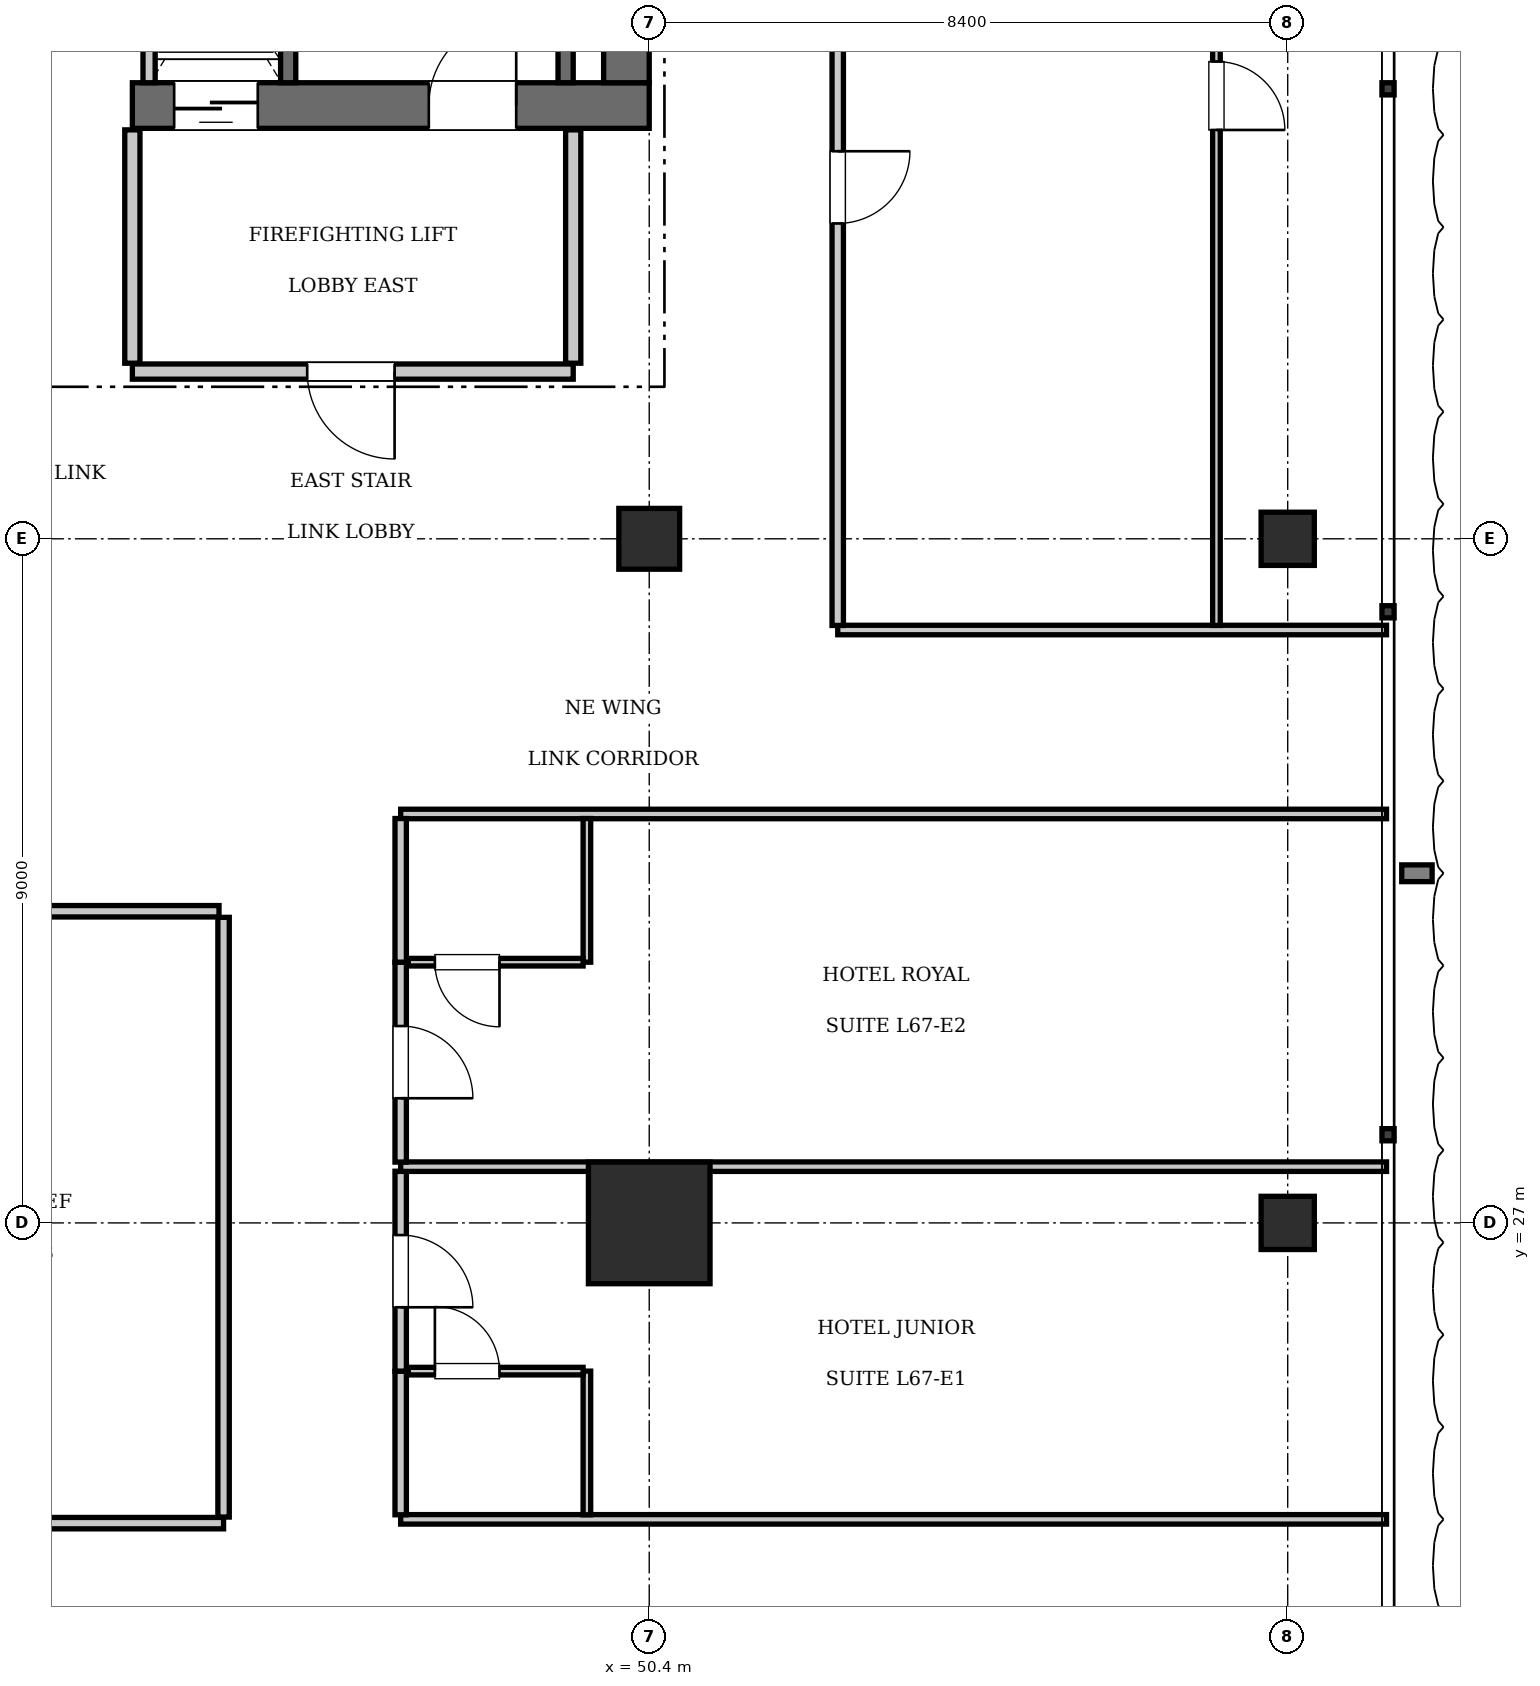
"""IFC4 building model, lengths in metres.
Left out: names, types, materials, properties, quantities, classifications, styles, units other than length and angle.
Written with IfcOpenShell. Run it as: python <this file> out.ifc"""

import sys

from ifc_helpers import new_model, si_unit, direction, frame, frame_2d, origin, origin_2d, place, context, subcontext, project, spatial, rectangle, extrude, element, fill, save


model = new_model("IFC4")
c1 = context("Model", 3, precision=1e-05, world=origin(), true_north=direction((0.0, 1.0)))
c2 = subcontext(c1, "Body", "Model", "MODEL_VIEW")
j1 = project(units=[si_unit("LENGTHUNIT", "METRE"), si_unit("PLANEANGLEUNIT", "RADIAN")], contexts=[c1])
p1 = place(None, origin())
s1 = spatial("IfcSite", under=j1, at=p1, CompositionType="ELEMENT")
p2 = place(p1, origin())
s2 = spatial("IfcBuilding", under=s1, at=p2, CompositionType="ELEMENT")
p3 = place(p2, frame((0.0, 0.0, 274.05)))
s3 = spatial("IfcBuildingStorey", under=s2, at=p3, CompositionType="ELEMENT", Elevation=274.05)
p4 = place(p3, frame((50.4, 27.0, 0.0), z_axis=(0.0, 0.0, 1.0), x_axis=(1.0, 0.0, 0.0)))
e1 = element("IfcColumn", 1, at=p4, inside=s3, PredefinedType="COLUMN", context=c2, shape_type="SweptSolid", body=[
    extrude(rectangle(XDim=1.6, YDim=1.6, at=origin_2d()), origin(), (0.0, 0.0, 1.0), 3.85),
])
p5 = place(p3, frame((43.6, 41.7, 0.0), z_axis=(0.0, 0.0, 1.0), x_axis=(1.0, 0.0, 0.0)))
e2 = element("IfcWall", 2, at=p5, inside=s3, PredefinedType="SHEAR", context=c2, shape_type="SweptSolid", body=[
    extrude(rectangle(XDim=6.8, YDim=0.6, at=frame_2d((3.4, 0.0))), origin(), (0.0, 0.0, 1.0), 3.85),
])
p6 = place(p5, frame((3.9, 0.0, 0.0)))
e3 = element("IfcOpeningElement", 3, at=p6, cuts=e2, PredefinedType="OPENING", context=c2, shape_type="SweptSolid", body=[
    extrude(rectangle(XDim=1.15, YDim=2.15, at=frame_2d((0.575, 1.075))), frame((0.0, 0.31, 0.0), z_axis=(0.0, -1.0, 0.0), x_axis=(1.0, 0.0, 0.0)), (0.0, 0.0, 1.0), 0.62),
])
p7 = place(p5, frame((0.55, 0.0, 0.0)))
e4 = element("IfcOpeningElement", 4, at=p7, cuts=e2, PredefinedType="OPENING", context=c2, shape_type="SweptSolid", body=[
    extrude(rectangle(XDim=1.1, YDim=2.2, at=frame_2d((0.55, 1.1))), frame((0.0, 0.31, 0.0), z_axis=(0.0, -1.0, 0.0), x_axis=(1.0, 0.0, 0.0)), (0.0, 0.0, 1.0), 0.62),
])
p8 = place(p3, frame((50.1, 42.0, 0.0), z_axis=(0.0, 0.0, 1.0), x_axis=(0.0, 1.0, 0.0)))
e5 = element("IfcWall", 5, at=p8, inside=s3, PredefinedType="SHEAR", context=c2, shape_type="SweptSolid", body=[
    extrude(rectangle(XDim=2.2, YDim=0.6, at=frame_2d((1.1, 0.0))), origin(), (0.0, 0.0, 1.0), 3.85),
])
p9 = place(p3, frame((50.4, 36.0, 0.0), z_axis=(0.0, 0.0, 1.0), x_axis=(1.0, 0.0, 0.0)))
e6 = element("IfcColumn", 6, at=p9, inside=s3, PredefinedType="COLUMN", context=c2, shape_type="SweptSolid", body=[
    extrude(rectangle(XDim=0.8, YDim=0.8, at=origin_2d()), origin(), (0.0, 0.0, 1.0), 3.85),
])
for number, where, z_axis, x_axis in (
    (7, (58.8, 27.0, 0.0), (0.0, 0.0, 1.0), (1.0, 0.0, 0.0)),
    (8, (58.8, 36.0, 0.0), (0.0, 0.0, 1.0), (1.0, 0.0, 0.0)),
):
    element("IfcColumn", number, at=place(p3, frame(where, z_axis=z_axis, x_axis=x_axis)), inside=s3, PredefinedType="COLUMN", context=c2, shape_type="SweptSolid", body=[
        extrude(rectangle(XDim=0.7, YDim=0.7, at=origin_2d()), origin(), (0.0, 0.0, 1.0), 3.85),
    ])
p10 = place(p3, frame((45.65, 42.0, 0.0), z_axis=(0.0, 0.0, 1.0), x_axis=(0.0, 1.0, 0.0)))
e9 = element("IfcWall", 9, at=p10, inside=s3, PredefinedType="SOLIDWALL", context=c2, shape_type="SweptSolid", body=[
    extrude(rectangle(XDim=9.15, YDim=0.2, at=frame_2d((4.575, 0.0))), origin(), (0.0, 0.0, 1.0), 3.61),
])
p11 = place(p3, frame((49.3, 42.0, 0.0), z_axis=(0.0, 0.0, 1.0), x_axis=(0.0, 1.0, 0.0)))
e10 = element("IfcWall", 10, at=p11, inside=s3, PredefinedType="SOLIDWALL", context=c2, shape_type="SweptSolid", body=[
    extrude(rectangle(XDim=9.12, YDim=0.2, at=frame_2d((4.56, 0.0))), origin(), (0.0, 0.0, 1.0), 3.61),
])
p12 = place(p3, frame((43.82, 42.0, 0.0), z_axis=(0.0, 0.0, 1.0), x_axis=(0.0, 1.0, 0.0)))
e11 = element("IfcWall", 11, at=p12, inside=s3, PredefinedType="SOLIDWALL", context=c2, shape_type="SweptSolid", body=[
    extrude(rectangle(XDim=2.74, YDim=0.16, at=frame_2d((1.37, 0.0))), origin(), (0.0, 0.0, 1.0), 3.61),
])
p13 = place(p3, frame((43.6, 38.2, 0.0), z_axis=(0.0, 0.0, 1.0), x_axis=(1.0, 0.0, 0.0)))
e12 = element("IfcWall", 12, at=p13, inside=s3, PredefinedType="PARTITIONING", context=c2, shape_type="SweptSolid", body=[
    extrude(rectangle(XDim=5.8, YDim=0.2, at=frame_2d((2.9, 0.0))), origin(), (0.0, 0.0, 1.0), 3.61),
])
p14 = place(p13, frame((2.3, 0.0, 0.0)))
e13 = element("IfcOpeningElement", 13, at=p14, cuts=e12, PredefinedType="OPENING", context=c2, shape_type="SweptSolid", body=[
    extrude(rectangle(XDim=1.15, YDim=2.15, at=frame_2d((0.575, 1.075))), frame((0.0, 0.11, 0.0), z_axis=(0.0, -1.0, 0.0), x_axis=(1.0, 0.0, 0.0)), (0.0, 0.0, 1.0), 0.22),
])
for number, where, z_axis, x_axis in (
    (14, (43.6, 38.31, 0.0), (0.0, 0.0, 1.0), (0.0, 1.0, 0.0)),
    (15, (49.4, 38.31, 0.0), (0.0, 0.0, 1.0), (0.0, 1.0, 0.0)),
):
    element("IfcWall", number, at=place(p3, frame(where, z_axis=z_axis, x_axis=x_axis)), inside=s3, PredefinedType="PARTITIONING", context=c2, shape_type="SweptSolid", body=[
        extrude(rectangle(XDim=3.07, YDim=0.2, at=frame_2d((1.535, 0.0))), origin(), (0.0, 0.0, 1.0), 3.61),
    ])
p15 = place(p3, frame((30.85, 23.05, 0.0), z_axis=(0.0, 0.0, 1.0), x_axis=(1.0, 0.0, 0.0)))
e16 = element("IfcWall", 16, at=p15, inside=s3, PredefinedType="PARTITIONING", context=c2, shape_type="SweptSolid", body=[
    extrude(rectangle(XDim=13.95, YDim=0.15, at=frame_2d((6.975, 0.0))), origin(), (0.0, 0.0, 1.0), 3.61),
])
p16 = place(p3, frame((44.8, 23.13, 0.0), z_axis=(0.0, 0.0, 1.0), x_axis=(0.0, 1.0, 0.0)))
e17 = element("IfcWall", 17, at=p16, inside=s3, PredefinedType="PARTITIONING", context=c2, shape_type="SweptSolid", body=[
    extrude(rectangle(XDim=7.89, YDim=0.15, at=frame_2d((3.945, 0.0))), origin(), (0.0, 0.0, 1.0), 3.61),
])
p17 = place(p3, frame((38.832, 31.1, 0.0), z_axis=(0.0, 0.0, 1.0), x_axis=(1.0, 0.0, 0.0)))
e18 = element("IfcWall", 18, at=p17, inside=s3, PredefinedType="PARTITIONING", context=c2, shape_type="SweptSolid", body=[
    extrude(rectangle(XDim=5.908, YDim=0.15, at=frame_2d((2.954, 0.0))), origin(), (0.0, 0.0, 1.0), 3.61),
])
p18 = place(p17, frame((2.504, 0.0, 0.0)))
e19 = element("IfcOpeningElement", 19, at=p18, cuts=e18, PredefinedType="OPENING", context=c2, shape_type="SweptSolid", body=[
    extrude(rectangle(XDim=0.9, YDim=2.1, at=frame_2d((0.45, 1.05))), frame((0.0, 0.085, 0.0), z_axis=(0.0, -1.0, 0.0), x_axis=(1.0, 0.0, 0.0)), (0.0, 0.0, 1.0), 0.17),
])
for number, where, z_axis, x_axis in (
    (20, (47.13, 23.1, 0.0), (0.0, 0.0, 1.0), (1.0, 0.0, 0.0)),
    (21, (47.13, 32.38, 0.0), (0.0, 0.0, 1.0), (1.0, 0.0, 0.0)),
):
    element("IfcWall", number, at=place(p3, frame(where, z_axis=z_axis, x_axis=x_axis)), inside=s3, PredefinedType="PARTITIONING", context=c2, shape_type="SweptSolid", body=[
        extrude(rectangle(XDim=12.97, YDim=0.125, at=frame_2d((6.485, 0.0))), origin(), (0.0, 0.0, 1.0), 3.61),
    ])
p19 = place(p3, frame((47.13, 23.16, 0.0), z_axis=(0.0, 0.0, 1.0), x_axis=(0.0, 1.0, 0.0)))
e22 = element("IfcWall", 22, at=p19, inside=s3, PredefinedType="PARTITIONING", context=c2, shape_type="SweptSolid", body=[
    extrude(rectangle(XDim=1.89, YDim=0.15, at=frame_2d((0.945, 0.0))), origin(), (0.0, 0.0, 1.0), 3.61),
])
p20 = place(p3, frame((47.13, 25.05, 0.0), z_axis=(0.0, 0.0, 1.0), x_axis=(0.0, 1.0, 0.0)))
e23 = element("IfcWall", 23, at=p20, inside=s3, PredefinedType="PARTITIONING", context=c2, shape_type="SweptSolid", body=[
    extrude(rectangle(XDim=2.63, YDim=0.15, at=frame_2d((1.315, 0.0))), origin(), (0.0, 0.0, 1.0), 3.61),
])
p21 = place(p20, frame((0.84, 0.0, 0.0)))
e24 = element("IfcOpeningElement", 24, at=p21, cuts=e23, PredefinedType="OPENING", context=c2, shape_type="SweptSolid", body=[
    extrude(rectangle(XDim=0.95, YDim=2.15, at=frame_2d((0.475, 1.075))), frame((0.0, 0.085, 0.0), z_axis=(0.0, -1.0, 0.0), x_axis=(1.0, 0.0, 0.0)), (0.0, 0.0, 1.0), 0.17),
])
p22 = place(p3, frame((49.58, 23.16, 0.0), z_axis=(0.0, 0.0, 1.0), x_axis=(0.0, 1.0, 0.0)))
e25 = element("IfcWall", 25, at=p22, inside=s3, PredefinedType="PARTITIONING", context=c2, shape_type="SweptSolid", body=[
    extrude(rectangle(XDim=1.89, YDim=0.1, at=frame_2d((0.945, 0.0))), origin(), (0.0, 0.0, 1.0), 3.61),
])
p23 = place(p3, frame((47.23, 25.05, 0.0), z_axis=(0.0, 0.0, 1.0), x_axis=(1.0, 0.0, 0.0)))
e26 = element("IfcWall", 26, at=p23, inside=s3, PredefinedType="PARTITIONING", context=c2, shape_type="SweptSolid", body=[
    extrude(rectangle(XDim=2.3, YDim=0.1, at=frame_2d((1.15, 0.0))), origin(), (0.0, 0.0, 1.0), 3.61),
])
p24 = place(p23, frame((0.35, 0.0, 0.0)))
e27 = element("IfcOpeningElement", 27, at=p24, cuts=e26, PredefinedType="OPENING", context=c2, shape_type="SweptSolid", body=[
    extrude(rectangle(XDim=0.85, YDim=2.1, at=frame_2d((0.425, 1.05))), frame((0.0, 0.06, 0.0), z_axis=(0.0, -1.0, 0.0), x_axis=(1.0, 0.0, 0.0)), (0.0, 0.0, 1.0), 0.12),
])
p25 = place(p3, frame((47.13, 27.74, 0.0), z_axis=(0.0, 0.0, 1.0), x_axis=(1.0, 0.0, 0.0)))
e28 = element("IfcWall", 28, at=p25, inside=s3, PredefinedType="PARTITIONING", context=c2, shape_type="SweptSolid", body=[
    extrude(rectangle(XDim=12.97, YDim=0.125, at=frame_2d((6.485, 0.0))), origin(), (0.0, 0.0, 1.0), 3.61),
])
p26 = place(p3, frame((47.13, 27.8, 0.0), z_axis=(0.0, 0.0, 1.0), x_axis=(0.0, 1.0, 0.0)))
e29 = element("IfcWall", 29, at=p26, inside=s3, PredefinedType="PARTITIONING", context=c2, shape_type="SweptSolid", body=[
    extrude(rectangle(XDim=2.63, YDim=0.15, at=frame_2d((1.315, 0.0))), origin(), (0.0, 0.0, 1.0), 3.61),
])
p27 = place(p26, frame((0.84, 0.0, 0.0)))
e30 = element("IfcOpeningElement", 30, at=p27, cuts=e29, PredefinedType="OPENING", context=c2, shape_type="SweptSolid", body=[
    extrude(rectangle(XDim=0.95, YDim=2.15, at=frame_2d((0.475, 1.075))), frame((0.0, 0.085, 0.0), z_axis=(0.0, -1.0, 0.0), x_axis=(1.0, 0.0, 0.0)), (0.0, 0.0, 1.0), 0.17),
])
p28 = place(p3, frame((47.13, 30.43, 0.0), z_axis=(0.0, 0.0, 1.0), x_axis=(0.0, 1.0, 0.0)))
e31 = element("IfcWall", 31, at=p28, inside=s3, PredefinedType="PARTITIONING", context=c2, shape_type="SweptSolid", body=[
    extrude(rectangle(XDim=1.89, YDim=0.15, at=frame_2d((0.945, 0.0))), origin(), (0.0, 0.0, 1.0), 3.61),
])
p29 = place(p3, frame((49.58, 30.43, 0.0), z_axis=(0.0, 0.0, 1.0), x_axis=(0.0, 1.0, 0.0)))
e32 = element("IfcWall", 32, at=p29, inside=s3, PredefinedType="PARTITIONING", context=c2, shape_type="SweptSolid", body=[
    extrude(rectangle(XDim=1.89, YDim=0.1, at=frame_2d((0.945, 0.0))), origin(), (0.0, 0.0, 1.0), 3.61),
])
p30 = place(p3, frame((47.23, 30.43, 0.0), z_axis=(0.0, 0.0, 1.0), x_axis=(1.0, 0.0, 0.0)))
e33 = element("IfcWall", 33, at=p30, inside=s3, PredefinedType="PARTITIONING", context=c2, shape_type="SweptSolid", body=[
    extrude(rectangle(XDim=2.3, YDim=0.1, at=frame_2d((1.15, 0.0))), origin(), (0.0, 0.0, 1.0), 3.61),
])
p31 = place(p30, frame((0.35, 0.0, 0.0)))
e34 = element("IfcOpeningElement", 34, at=p31, cuts=e33, PredefinedType="OPENING", context=c2, shape_type="SweptSolid", body=[
    extrude(rectangle(XDim=0.85, YDim=2.1, at=frame_2d((0.425, 1.05))), frame((0.0, 0.06, 0.0), z_axis=(0.0, -1.0, 0.0), x_axis=(1.0, 0.0, 0.0)), (0.0, 0.0, 1.0), 0.12),
])
p32 = place(p3, frame((52.88, 34.8, 0.0), z_axis=(0.0, 0.0, 1.0), x_axis=(1.0, 0.0, 0.0)))
e35 = element("IfcWall", 35, at=p32, inside=s3, PredefinedType="PARTITIONING", context=c2, shape_type="SweptSolid", body=[
    extrude(rectangle(XDim=7.22, YDim=0.125, at=frame_2d((3.61, 0.0))), origin(), (0.0, 0.0, 1.0), 3.61),
])
p33 = place(p3, frame((52.88, 34.86, 0.0), z_axis=(0.0, 0.0, 1.0), x_axis=(0.0, 1.0, 0.0)))
e36 = element("IfcWall", 36, at=p33, inside=s3, PredefinedType="PARTITIONING", context=c2, shape_type="SweptSolid", body=[
    extrude(rectangle(XDim=11.527, YDim=0.15, at=frame_2d((5.764, 0.0))), origin(), (0.0, 0.0, 1.0), 3.61),
])
p34 = place(p33, frame((5.289, 0.0, 0.0)))
e37 = element("IfcOpeningElement", 37, at=p34, cuts=e36, PredefinedType="OPENING", context=c2, shape_type="SweptSolid", body=[
    extrude(rectangle(XDim=0.95, YDim=2.15, at=frame_2d((0.475, 1.075))), frame((0.0, 0.085, 0.0), z_axis=(0.0, -1.0, 0.0), x_axis=(1.0, 0.0, 0.0)), (0.0, 0.0, 1.0), 0.17),
])
p35 = place(p3, frame((57.862, 34.86, 0.0), z_axis=(0.0, 0.0, 1.0), x_axis=(0.0, 1.0, 0.0)))
e38 = element("IfcWall", 38, at=p35, inside=s3, PredefinedType="PARTITIONING", context=c2, shape_type="SweptSolid", body=[
    extrude(rectangle(XDim=13.938, YDim=0.1, at=frame_2d((6.969, 0.0))), origin(), (0.0, 0.0, 1.0), 3.61),
])
p36 = place(p35, frame((6.519, 0.0, 0.0)))
e39 = element("IfcOpeningElement", 39, at=p36, cuts=e38, PredefinedType="OPENING", context=c2, shape_type="SweptSolid", body=[
    extrude(rectangle(XDim=0.9, YDim=2.1, at=frame_2d((0.45, 1.05))), frame((0.0, 0.06, 0.0), z_axis=(0.0, -1.0, 0.0), x_axis=(1.0, 0.0, 0.0)), (0.0, 0.0, 1.0), 0.12),
])
p37 = place(p6, origin())
e40 = element("IfcDoor", 40, at=p37, inside=s3, OperationType="SINGLE_SWING_RIGHT", PredefinedType="DOOR", context=c2, shape_type="SweptSolid", body=[
    extrude(rectangle(XDim=1.15, YDim=2.15, at=frame_2d((0.575, 1.075))), frame((0.0, 0.025, 0.0), z_axis=(0.0, -1.0, 0.0), x_axis=(1.0, 0.0, 0.0)), (0.0, 0.0, 1.0), 0.05),
])
fill(e3, e40)
p38 = place(p7, frame((1.1, 0.0, 0.0), z_axis=(0.0, 0.0, 1.0), x_axis=(-1.0, 0.0, 0.0)))
e41 = element("IfcDoor", 41, at=p38, inside=s3, OperationType="SLIDING_TO_LEFT", PredefinedType="DOOR", context=c2, shape_type="SweptSolid", body=[
    extrude(rectangle(XDim=1.1, YDim=2.2, at=frame_2d((0.55, 1.1))), frame((0.0, 0.025, 0.0), z_axis=(0.0, -1.0, 0.0), x_axis=(1.0, 0.0, 0.0)), (0.0, 0.0, 1.0), 0.05),
])
fill(e4, e41)
p39 = place(p14, frame((1.15, 0.0, 0.0), z_axis=(0.0, 0.0, 1.0), x_axis=(-1.0, 0.0, 0.0)))
e42 = element("IfcDoor", 42, at=p39, inside=s3, OperationType="SINGLE_SWING_LEFT", PredefinedType="DOOR", context=c2, shape_type="SweptSolid", body=[
    extrude(rectangle(XDim=1.15, YDim=2.15, at=frame_2d((0.575, 1.075))), frame((0.0, 0.025, 0.0), z_axis=(0.0, -1.0, 0.0), x_axis=(1.0, 0.0, 0.0)), (0.0, 0.0, 1.0), 0.05),
])
fill(e13, e42)
p40 = place(p24, origin())
e43 = element("IfcDoor", 43, at=p40, inside=s3, OperationType="SINGLE_SWING_LEFT", PredefinedType="DOOR", context=c2, shape_type="SweptSolid", body=[
    extrude(rectangle(XDim=0.85, YDim=2.1, at=frame_2d((0.425, 1.05))), frame((0.0, 0.025, 0.0), z_axis=(0.0, -1.0, 0.0), x_axis=(1.0, 0.0, 0.0)), (0.0, 0.0, 1.0), 0.05),
])
fill(e27, e43)
p41 = place(p21, frame((0.95, 0.0, 0.0), z_axis=(0.0, 0.0, 1.0), x_axis=(-1.0, 0.0, 0.0)))
e44 = element("IfcDoor", 44, at=p41, inside=s3, OperationType="SINGLE_SWING_RIGHT", PredefinedType="DOOR", context=c2, shape_type="SweptSolid", body=[
    extrude(rectangle(XDim=0.95, YDim=2.15, at=frame_2d((0.475, 1.075))), frame((0.0, 0.025, 0.0), z_axis=(0.0, -1.0, 0.0), x_axis=(1.0, 0.0, 0.0)), (0.0, 0.0, 1.0), 0.05),
])
fill(e24, e44)
p42 = place(p31, frame((0.85, 0.0, 0.0), z_axis=(0.0, 0.0, 1.0), x_axis=(-1.0, 0.0, 0.0)))
e45 = element("IfcDoor", 45, at=p42, inside=s3, OperationType="SINGLE_SWING_LEFT", PredefinedType="DOOR", context=c2, shape_type="SweptSolid", body=[
    extrude(rectangle(XDim=0.85, YDim=2.1, at=frame_2d((0.425, 1.05))), frame((0.0, 0.025, 0.0), z_axis=(0.0, -1.0, 0.0), x_axis=(1.0, 0.0, 0.0)), (0.0, 0.0, 1.0), 0.05),
])
fill(e34, e45)
p43 = place(p27, frame((0.95, 0.0, 0.0), z_axis=(0.0, 0.0, 1.0), x_axis=(-1.0, 0.0, 0.0)))
e46 = element("IfcDoor", 46, at=p43, inside=s3, OperationType="SINGLE_SWING_RIGHT", PredefinedType="DOOR", context=c2, shape_type="SweptSolid", body=[
    extrude(rectangle(XDim=0.95, YDim=2.15, at=frame_2d((0.475, 1.075))), frame((0.0, 0.025, 0.0), z_axis=(0.0, -1.0, 0.0), x_axis=(1.0, 0.0, 0.0)), (0.0, 0.0, 1.0), 0.05),
])
fill(e30, e46)
p44 = place(p34, frame((0.95, 0.0, 0.0), z_axis=(0.0, 0.0, 1.0), x_axis=(-1.0, 0.0, 0.0)))
e47 = element("IfcDoor", 47, at=p44, inside=s3, OperationType="SINGLE_SWING_LEFT", PredefinedType="DOOR", context=c2, shape_type="SweptSolid", body=[
    extrude(rectangle(XDim=0.95, YDim=2.15, at=frame_2d((0.475, 1.075))), frame((0.0, 0.025, 0.0), z_axis=(0.0, -1.0, 0.0), x_axis=(1.0, 0.0, 0.0)), (0.0, 0.0, 1.0), 0.05),
])
fill(e37, e47)
p45 = place(p36, frame((0.9, 0.0, 0.0), z_axis=(0.0, 0.0, 1.0), x_axis=(-1.0, 0.0, 0.0)))
e48 = element("IfcDoor", 48, at=p45, inside=s3, OperationType="SINGLE_SWING_RIGHT", PredefinedType="DOOR", context=c2, shape_type="SweptSolid", body=[
    extrude(rectangle(XDim=0.9, YDim=2.1, at=frame_2d((0.45, 1.05))), frame((0.0, 0.025, 0.0), z_axis=(0.0, -1.0, 0.0), x_axis=(1.0, 0.0, 0.0)), (0.0, 0.0, 1.0), 0.05),
])
fill(e39, e48)
save(model, sys.argv[1])
